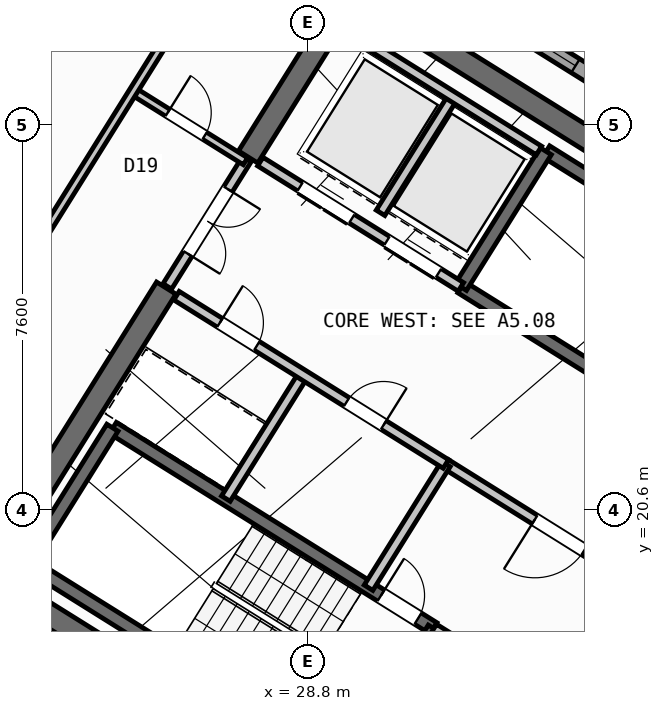
"""IFC4 building model, lengths in metres.
Left out: names, types, materials, properties, quantities, classifications, styles, units other than length and angle.
Written with IfcOpenShell. Run it as: python <this file> out.ifc"""

import sys

from ifc_helpers import new_model, si_unit, direction, frame, frame_2d, origin, place, context, subcontext, project, spatial, rectangle, extrude, source, transform, mapped, element, fill, save


model = new_model("IFC4")
c1 = context("Model", 3, precision=1e-05, world=origin(), true_north=direction((0.0, 1.0)))
c2 = subcontext(c1, "Body", "Model", "MODEL_VIEW")
j1 = project(units=[si_unit("LENGTHUNIT", "METRE"), si_unit("PLANEANGLEUNIT", "RADIAN")], contexts=[c1])
p1 = place(None, origin())
s1 = spatial("IfcSite", under=j1, at=p1, CompositionType="ELEMENT")
p2 = place(p1, origin())
s2 = spatial("IfcBuilding", under=s1, at=p2, CompositionType="ELEMENT")
p3 = place(p2, frame((0.0, 0.0, 291.6)))
s3 = spatial("IfcBuildingStorey", under=s2, at=p3, CompositionType="ELEMENT", Elevation=291.6)
p4 = place(p3, frame((40.531, 24.036, 0.0), z_axis=(0.0, 0.0, 1.0), x_axis=(-0.848048787466, 0.529918157905, 0.0)))
e1 = element("IfcWall", 1, at=p4, inside=s3, PredefinedType="SHEAR", context=c2, shape_type="SweptSolid", body=[
    extrude(rectangle(XDim=13.04, YDim=0.45, at=frame_2d((6.52, 0.0))), origin(), (0.0, 0.0, 1.0), 3.35),
])
p5 = place(p3, frame((33.324, 12.503, 0.0), z_axis=(0.0, 0.0, 1.0), x_axis=(-0.848043529849, 0.529926571782, 0.0)))
e2 = element("IfcWall", 2, at=p5, inside=s3, PredefinedType="SHEAR", context=c2, shape_type="SweptSolid", body=[
    extrude(rectangle(XDim=13.04, YDim=0.45, at=frame_2d((6.52, 0.0))), origin(), (0.0, 0.0, 1.0), 3.35),
])
p6 = place(p3, frame((36.683, 18.304, 0.0), z_axis=(0.0, 0.0, 1.0), x_axis=(-0.529904039071, -0.848057609704, 0.0)))
e3 = element("IfcWall", 3, at=p6, inside=s3, PredefinedType="SHEAR", context=c2, shape_type="SweptSolid", body=[
    extrude(rectangle(XDim=6.475, YDim=0.45, at=frame_2d((3.238, 0.0))), origin(), (0.0, 0.0, 1.0), 3.35),
])
p7 = place(p3, frame((29.544, 30.636, 0.0), z_axis=(0.0, 0.0, 1.0), x_axis=(-0.529902075036, -0.848058836916, 0.0)))
e4 = element("IfcWall", 4, at=p7, inside=s3, PredefinedType="SHEAR", context=c2, shape_type="SweptSolid", body=[
    extrude(rectangle(XDim=3.625, YDim=0.45, at=frame_2d((1.812, 0.0))), origin(), (0.0, 0.0, 1.0), 3.35),
])
p8 = place(p3, frame((26.007, 24.976, 0.0), z_axis=(0.0, 0.0, 1.0), x_axis=(-0.529931155655, -0.848040665456, 0.0)))
e5 = element("IfcWall", 5, at=p8, inside=s3, PredefinedType="SHEAR", context=c2, shape_type="SweptSolid", body=[
    extrude(rectangle(XDim=6.475, YDim=0.45, at=frame_2d((3.238, 0.0))), origin(), (0.0, 0.0, 1.0), 3.35),
])
p9 = place(p3, frame((29.268, 6.429, 0.0), z_axis=(0.0, 0.0, 1.0), x_axis=(-0.848048398186, 0.529918780885, 0.0)))
e6 = element("IfcWall", 6, at=p9, inside=s3, PredefinedType="STANDARD", context=c2, shape_type="SweptSolid", body=[
    extrude(rectangle(XDim=25.188, YDim=0.32, at=frame_2d((12.594, 0.0))), origin(), (0.0, 0.0, 1.0), 3.35),
])
p10 = place(p9, frame((16.362, 0.0, 0.0)))
e7 = element("IfcOpeningElement", 7, at=p10, cuts=e6, PredefinedType="OPENING", context=c2, shape_type="SweptSolid", body=[
    extrude(rectangle(XDim=1.2, YDim=2.15, at=frame_2d((0.6, 1.075))), frame((0.0, 0.17, 0.0), z_axis=(0.0, -1.0, 0.0), x_axis=(1.0, 0.0, 0.0)), (0.0, 0.0, 1.0), 0.34),
])
p11 = place(p9, frame((3.859, 0.0, 0.9)))
e8 = element("IfcOpeningElement", 8, at=p11, cuts=e6, PredefinedType="OPENING", context=c2, shape_type="SweptSolid", body=[
    extrude(rectangle(XDim=1.65, YDim=1.45, at=frame_2d((0.825, 0.725))), frame((0.0, 0.17, 0.0), z_axis=(0.0, -1.0, 0.0), x_axis=(1.0, 0.0, 0.0)), (0.0, 0.0, 1.0), 0.34),
])
p12 = place(p9, frame((10.519, 0.0, 0.9)))
e9 = element("IfcOpeningElement", 9, at=p12, cuts=e6, PredefinedType="OPENING", context=c2, shape_type="SweptSolid", body=[
    extrude(rectangle(XDim=1.65, YDim=1.45, at=frame_2d((0.825, 0.725))), frame((0.0, 0.17, 0.0), z_axis=(0.0, -1.0, 0.0), x_axis=(1.0, 0.0, 0.0)), (0.0, 0.0, 1.0), 0.34),
])
p13 = place(p9, frame((21.156, 0.0, 0.95)))
e10 = element("IfcOpeningElement", 10, at=p13, cuts=e6, PredefinedType="OPENING", context=c2, shape_type="SweptSolid", body=[
    extrude(rectangle(XDim=1.95, YDim=1.35, at=frame_2d((0.975, 0.675))), frame((0.0, 0.17, 0.0), z_axis=(0.0, -1.0, 0.0), x_axis=(1.0, 0.0, 0.0)), (0.0, 0.0, 1.0), 0.34),
])
p14 = place(p3, frame((19.566, 38.434, 0.0), z_axis=(0.0, 0.0, 1.0), x_axis=(0.84804567626, -0.529923136858, 0.0)))
e11 = element("IfcWall", 11, at=p14, inside=s3, PredefinedType="STANDARD", context=c2, shape_type="SweptSolid", body=[
    extrude(rectangle(XDim=25.188, YDim=0.32, at=frame_2d((12.594, 0.0))), origin(), (0.0, 0.0, 1.0), 3.35),
])
p15 = place(p14, frame((3.55, 0.0, 0.0)))
e12 = element("IfcOpeningElement", 12, at=p15, cuts=e11, PredefinedType="OPENING", context=c2, shape_type="SweptSolid", body=[
    extrude(rectangle(XDim=1.05, YDim=2.15, at=frame_2d((0.525, 1.075))), frame((0.0, 0.17, 0.0), z_axis=(0.0, -1.0, 0.0), x_axis=(1.0, 0.0, 0.0)), (0.0, 0.0, 1.0), 0.34),
])
p16 = place(p14, frame((7.349, 0.0, 0.9)))
e13 = element("IfcOpeningElement", 13, at=p16, cuts=e11, PredefinedType="OPENING", context=c2, shape_type="SweptSolid", body=[
    extrude(rectangle(XDim=1.65, YDim=1.45, at=frame_2d((0.825, 0.725))), frame((0.0, 0.17, 0.0), z_axis=(0.0, -1.0, 0.0), x_axis=(1.0, 0.0, 0.0)), (0.0, 0.0, 1.0), 0.34),
])
p17 = place(p14, frame((10.754, 0.0, 1.0)))
e14 = element("IfcOpeningElement", 14, at=p17, cuts=e11, PredefinedType="OPENING", context=c2, shape_type="SweptSolid", body=[
    extrude(rectangle(XDim=0.9, YDim=1.25, at=frame_2d((0.45, 0.625))), frame((0.0, 0.17, 0.0), z_axis=(0.0, -1.0, 0.0), x_axis=(1.0, 0.0, 0.0)), (0.0, 0.0, 1.0), 0.34),
])
p18 = place(p14, frame((15.169, 0.0, 0.95)))
e15 = element("IfcOpeningElement", 15, at=p18, cuts=e11, PredefinedType="OPENING", context=c2, shape_type="SweptSolid", body=[
    extrude(rectangle(XDim=1.95, YDim=1.35, at=frame_2d((0.975, 0.675))), frame((0.0, 0.17, 0.0), z_axis=(0.0, -1.0, 0.0), x_axis=(1.0, 0.0, 0.0)), (0.0, 0.0, 1.0), 0.34),
])
p19 = place(p14, frame((20.869, 0.0, 0.95)))
e16 = element("IfcOpeningElement", 16, at=p19, cuts=e11, PredefinedType="OPENING", context=c2, shape_type="SweptSolid", body=[
    extrude(rectangle(XDim=1.95, YDim=1.35, at=frame_2d((0.975, 0.675))), frame((0.0, 0.17, 0.0), z_axis=(0.0, -1.0, 0.0), x_axis=(1.0, 0.0, 0.0)), (0.0, 0.0, 1.0), 0.34),
])
p20 = place(p3, frame((29.605, 15.581, 0.0), z_axis=(0.0, 0.0, 1.0), x_axis=(-0.848036911448, 0.529937163087, 0.0)))
e17 = element("IfcWall", 17, at=p20, inside=s3, PredefinedType="SHEAR", context=c2, shape_type="SweptSolid", body=[
    extrude(rectangle(XDim=7.46, YDim=0.26, at=frame_2d((3.73, 0.0))), origin(), (0.0, 0.0, 1.0), 3.35),
])
p21 = place(p3, frame((31.28, 18.261, 0.0), z_axis=(0.0, 0.0, 1.0), x_axis=(-0.848051618787, 0.529913626805, 0.0)))
e18 = element("IfcWall", 18, at=p21, inside=s3, PredefinedType="SHEAR", context=c2, shape_type="SweptSolid", body=[
    extrude(rectangle(XDim=7.46, YDim=0.26, at=frame_2d((3.73, 0.0))), origin(), (0.0, 0.0, 1.0), 3.35),
])
p22 = place(p21, frame((0.36, 0.0, 0.0)))
e19 = element("IfcOpeningElement", 19, at=p22, cuts=e18, PredefinedType="OPENING", context=c2, shape_type="SweptSolid", body=[
    extrude(rectangle(XDim=0.86, YDim=2.05, at=frame_2d((0.43, 1.025))), frame((0.0, 0.14, 0.0), z_axis=(0.0, -1.0, 0.0), x_axis=(1.0, 0.0, 0.0)), (0.0, 0.0, 1.0), 0.28),
])
p23 = place(p3, frame((31.288, 18.256, 0.0), z_axis=(0.0, 0.0, 1.0), x_axis=(-0.529943379326, -0.848033026897, 0.0)))
e20 = element("IfcWall", 20, at=p23, inside=s3, PredefinedType="SHEAR", context=c2, shape_type="SweptSolid", body=[
    extrude(rectangle(XDim=3.16, YDim=0.26, at=frame_2d((1.58, 0.0))), origin(), (0.0, 0.0, 1.0), 3.35),
])
p24 = place(p3, frame((24.945, 22.22, 0.0), z_axis=(0.0, 0.0, 1.0), x_axis=(-0.529908658664, -0.84805472316, 0.0)))
e21 = element("IfcWall", 21, at=p24, inside=s3, PredefinedType="SHEAR", context=c2, shape_type="SweptSolid", body=[
    extrude(rectangle(XDim=3.16, YDim=0.26, at=frame_2d((1.58, 0.0))), origin(), (0.0, 0.0, 1.0), 3.35),
])
p25 = place(p3, frame((39.721, 23.788, 0.0), z_axis=(0.0, 0.0, 1.0), x_axis=(-0.848054434086, 0.529909121291, 0.0)))
e22 = element("IfcWall", 22, at=p25, inside=s3, PredefinedType="SHEAR", context=c2, shape_type="SweptSolid", body=[
    extrude(rectangle(XDim=7.33, YDim=0.26, at=frame_2d((3.665, 0.0))), origin(), (0.0, 0.0, 1.0), 3.35),
])
p26 = place(p3, frame((38.046, 21.108, 0.0), z_axis=(0.0, 0.0, 1.0), x_axis=(-0.848054434086, 0.529909121291, 0.0)))
e23 = element("IfcWall", 23, at=p26, inside=s3, PredefinedType="SHEAR", context=c2, shape_type="SweptSolid", body=[
    extrude(rectangle(XDim=7.33, YDim=0.26, at=frame_2d((3.665, 0.0))), origin(), (0.0, 0.0, 1.0), 3.35),
])
p27 = place(p26, frame((0.22, 0.0, 0.0)))
e24 = element("IfcOpeningElement", 24, at=p27, cuts=e23, PredefinedType="OPENING", context=c2, shape_type="SweptSolid", body=[
    extrude(rectangle(XDim=1.1, YDim=2.1, at=frame_2d((0.55, 1.05))), frame((0.0, 0.14, 0.0), z_axis=(0.0, -1.0, 0.0), x_axis=(1.0, 0.0, 0.0)), (0.0, 0.0, 1.0), 0.28),
])
p28 = place(p3, frame((33.496, 27.677, 0.0), z_axis=(0.0, 0.0, 1.0), x_axis=(-0.529908658664, -0.84805472316, 0.0)))
e25 = element("IfcWall", 25, at=p28, inside=s3, PredefinedType="SHEAR", context=c2, shape_type="SweptSolid", body=[
    extrude(rectangle(XDim=3.16, YDim=0.26, at=frame_2d((1.58, 0.0))), origin(), (0.0, 0.0, 1.0), 3.35),
])
p29 = place(p3, frame((34.933, 15.978, 0.0), z_axis=(0.0, 0.0, 1.0), x_axis=(-0.848055739377, 0.529907032327, 0.0)))
e26 = element("IfcWall", 26, at=p29, inside=s3, PredefinedType="STANDARD", context=c2, shape_type="SweptSolid", body=[
    extrude(rectangle(XDim=4.298, YDim=0.2, at=frame_2d((2.149, 0.0))), origin(), (0.0, 0.0, 1.0), 3.34),
])
p30 = place(p29, frame((0.448, 0.0, 0.0)))
e27 = element("IfcOpeningElement", 27, at=p30, cuts=e26, PredefinedType="OPENING", context=c2, shape_type="SweptSolid", body=[
    extrude(rectangle(XDim=1.3, YDim=2.2, at=frame_2d((0.65, 1.1))), frame((0.0, 0.11, 0.0), z_axis=(0.0, -1.0, 0.0), x_axis=(1.0, 0.0, 0.0)), (0.0, 0.0, 1.0), 0.22),
])
p31 = place(p29, frame((2.523, 0.0, 0.0)))
e28 = element("IfcOpeningElement", 28, at=p31, cuts=e26, PredefinedType="OPENING", context=c2, shape_type="SweptSolid", body=[
    extrude(rectangle(XDim=1.45, YDim=2.25, at=frame_2d((0.725, 1.125))), frame((0.0, 0.11, 0.0), z_axis=(0.0, -1.0, 0.0), x_axis=(1.0, 0.0, 0.0)), (0.0, 0.0, 1.0), 0.22),
])
p32 = place(p3, frame((36.459, 18.421, 0.0), z_axis=(0.0, 0.0, 1.0), x_axis=(-0.848059591691, 0.529900867089, 0.0)))
e29 = element("IfcWall", 29, at=p32, inside=s3, PredefinedType="STANDARD", context=c2, shape_type="SweptSolid", body=[
    extrude(rectangle(XDim=5.818, YDim=0.2, at=frame_2d((2.909, 0.0))), origin(), (0.0, 0.0, 1.0), 3.34),
])
p33 = place(p32, frame((2.598, 0.0, 0.0)))
e30 = element("IfcOpeningElement", 30, at=p33, cuts=e29, PredefinedType="OPENING", context=c2, shape_type="SweptSolid", body=[
    extrude(rectangle(XDim=1.15, YDim=2.1, at=frame_2d((0.575, 1.05))), frame((0.0, 0.11, 0.0), z_axis=(0.0, -1.0, 0.0), x_axis=(1.0, 0.0, 0.0)), (0.0, 0.0, 1.0), 0.22),
])
p34 = place(p3, frame((31.822, 24.998, 0.0), z_axis=(0.0, 0.0, 1.0), x_axis=(-0.848054125777, 0.529909614701, 0.0)))
e31 = element("IfcWall", 31, at=p34, inside=s3, PredefinedType="STANDARD", context=c2, shape_type="SweptSolid", body=[
    extrude(rectangle(XDim=4.668, YDim=0.2, at=frame_2d((2.334, 0.0))), origin(), (0.0, 0.0, 1.0), 3.34),
])
p35 = place(p34, frame((0.52, 0.0, 0.0)))
e32 = element("IfcOpeningElement", 32, at=p35, cuts=e31, PredefinedType="OPENING", context=c2, shape_type="SweptSolid", body=[
    extrude(rectangle(XDim=1.2, YDim=2.15, at=frame_2d((0.6, 1.075))), frame((0.0, 0.11, 0.0), z_axis=(0.0, -1.0, 0.0), x_axis=(1.0, 0.0, 0.0)), (0.0, 0.0, 1.0), 0.22),
])
p36 = place(p34, frame((2.54, 0.0, 0.0)))
e33 = element("IfcOpeningElement", 33, at=p36, cuts=e31, PredefinedType="OPENING", context=c2, shape_type="SweptSolid", body=[
    extrude(rectangle(XDim=1.2, YDim=2.15, at=frame_2d((0.6, 1.075))), frame((0.0, 0.11, 0.0), z_axis=(0.0, -1.0, 0.0), x_axis=(1.0, 0.0, 0.0)), (0.0, 0.0, 1.0), 0.22),
])
p37 = place(p3, frame((31.645, 28.716, 0.0), z_axis=(0.0, 0.0, 1.0), x_axis=(-0.52986693015, -0.848080795876, 0.0)))
e34 = element("IfcWall", 34, at=p37, inside=s3, PredefinedType="STANDARD", context=c2, shape_type="SweptSolid", body=[
    extrude(rectangle(XDim=2.66, YDim=0.2, at=frame_2d((1.33, 0.0))), origin(), (0.0, 0.0, 1.0), 3.34),
])
p38 = place(p3, frame((33.363, 27.69, 0.0), z_axis=(0.0, 0.0, 1.0), x_axis=(-0.84804957148, 0.529916903215, 0.0)))
e35 = element("IfcWall", 35, at=p38, inside=s3, PredefinedType="STANDARD", context=c2, shape_type="SweptSolid", body=[
    extrude(rectangle(XDim=4.548, YDim=0.2, at=frame_2d((2.274, 0.0))), origin(), (0.0, 0.0, 1.0), 3.34),
])
for number, where, z_axis, x_axis in (
    (36, (31.525, 21.504, 0.0), (0.0, 0.0, 1.0), (-0.53, -0.848, 0.0)),
    (37, (28.71, 23.263, 0.0), (0.0, 0.0, 1.0), (-0.53, -0.848, 0.0)),
):
    element("IfcWall", number, at=place(p3, frame(where, z_axis=z_axis, x_axis=x_axis)), inside=s3, PredefinedType="STANDARD", context=c2, shape_type="SweptSolid", body=[
        extrude(rectangle(XDim=2.88, YDim=0.2, at=frame_2d((1.44, 0.0))), origin(), (0.0, 0.0, 1.0), 3.34),
    ])
p39 = place(p3, frame((31.525, 21.504, 0.0), z_axis=(0.0, 0.0, 1.0), x_axis=(-0.848042066329, 0.529928913853, 0.0)))
e38 = element("IfcWall", 38, at=p39, inside=s3, PredefinedType="STANDARD", context=c2, shape_type="SweptSolid", body=[
    extrude(rectangle(XDim=6.268, YDim=0.2, at=frame_2d((3.134, 0.0))), origin(), (0.0, 0.0, 1.0), 3.34),
])
p40 = place(p39, frame((4.4, 0.0, 0.0)))
e39 = element("IfcOpeningElement", 39, at=p40, cuts=e38, PredefinedType="OPENING", context=c2, shape_type="SweptSolid", body=[
    extrude(rectangle(XDim=0.86, YDim=2.05, at=frame_2d((0.43, 1.025))), frame((0.0, 0.11, 0.0), z_axis=(0.0, -1.0, 0.0), x_axis=(1.0, 0.0, 0.0)), (0.0, 0.0, 1.0), 0.22),
])
p41 = place(p39, frame((1.45, 0.0, 0.0)))
e40 = element("IfcOpeningElement", 40, at=p41, cuts=e38, PredefinedType="OPENING", context=c2, shape_type="SweptSolid", body=[
    extrude(rectangle(XDim=0.86, YDim=2.05, at=frame_2d((0.43, 1.025))), frame((0.0, 0.11, 0.0), z_axis=(0.0, -1.0, 0.0), x_axis=(1.0, 0.0, 0.0)), (0.0, 0.0, 1.0), 0.22),
])
p42 = place(p3, frame((27.596, 27.52, 0.0), z_axis=(0.0, 0.0, 1.0), x_axis=(-0.529865479138, -0.848081702443, 0.0)))
e41 = element("IfcWall", 41, at=p42, inside=s3, PredefinedType="STANDARD", context=c2, shape_type="SweptSolid", body=[
    extrude(rectangle(XDim=2.96, YDim=0.2, at=frame_2d((1.48, 0.0))), origin(), (0.0, 0.0, 1.0), 3.34),
])
p43 = place(p42, frame((0.7, 0.0, 0.0)))
e42 = element("IfcOpeningElement", 42, at=p43, cuts=e41, PredefinedType="OPENING", context=c2, shape_type="SweptSolid", body=[
    extrude(rectangle(XDim=1.5, YDim=2.15, at=frame_2d((0.75, 1.075))), frame((0.0, 0.11, 0.0), z_axis=(0.0, -1.0, 0.0), x_axis=(1.0, 0.0, 0.0)), (0.0, 0.0, 1.0), 0.22),
])
p44 = place(p3, frame((27.57, 27.478, 0.0), z_axis=(0.0, 0.0, 1.0), x_axis=(-0.848050851465, 0.529914854792, 0.0)))
e43 = element("IfcWall", 43, at=p44, inside=s3, PredefinedType="PARTITIONING", context=c2, shape_type="SweptSolid", body=[
    extrude(rectangle(XDim=2.61, YDim=0.16, at=frame_2d((1.305, 0.0))), origin(), (0.0, 0.0, 1.0), 3.34),
])
p45 = place(p44, frame((0.95, 0.0, 0.0)))
e44 = element("IfcOpeningElement", 44, at=p45, cuts=e43, PredefinedType="OPENING", context=c2, shape_type="SweptSolid", body=[
    extrude(rectangle(XDim=0.86, YDim=2.05, at=frame_2d((0.43, 1.025))), frame((0.0, 0.09, 0.0), z_axis=(0.0, -1.0, 0.0), x_axis=(1.0, 0.0, 0.0)), (0.0, 0.0, 1.0), 0.18),
])
p46 = place(p3, frame((27.953, 33.016, 0.0), z_axis=(0.0, 0.0, 1.0), x_axis=(-0.529903001606, -0.848058257957, 0.0)))
e45 = element("IfcWall", 45, at=p46, inside=s3, PredefinedType="PARTITIONING", context=c2, shape_type="SweptSolid", body=[
    extrude(rectangle(XDim=9.15, YDim=0.16, at=frame_2d((4.575, 0.0))), origin(), (0.0, 0.0, 1.0), 3.34),
])
p47 = place(p3, frame((24.309, 34.336, 0.0), z_axis=(0.0, 0.0, 1.0), x_axis=(-0.529895484599, -0.848062954858, 0.0)))
e46 = element("IfcWall", 46, at=p47, inside=s3, PredefinedType="PARTITIONING", context=c2, shape_type="SweptSolid", body=[
    extrude(rectangle(XDim=6.576, YDim=0.16, at=frame_2d((3.288, 0.0))), origin(), (0.0, 0.0, 1.0), 2.875),
])
p48 = place(p3, frame((32.164, 10.374, 0.0), z_axis=(0.0, 0.0, 1.0), x_axis=(-0.848044107957, 0.529925646633, 0.0)))
e47 = element("IfcWall", 47, at=p48, inside=s3, PredefinedType="PARTITIONING", context=c2, shape_type="SweptSolid", body=[
    extrude(rectangle(XDim=15.57, YDim=0.16, at=frame_2d((7.785, 0.0))), origin(), (0.0, 0.0, 1.0), 3.34),
])
p49 = place(p48, frame((10.83, 0.0, 0.0)))
e48 = element("IfcOpeningElement", 48, at=p49, cuts=e47, PredefinedType="OPENING", context=c2, shape_type="SweptSolid", body=[
    extrude(rectangle(XDim=1.0, YDim=2.1, at=frame_2d((0.5, 1.05))), frame((0.0, 0.09, 0.0), z_axis=(0.0, -1.0, 0.0), x_axis=(1.0, 0.0, 0.0)), (0.0, 0.0, 1.0), 0.18),
])
m1 = source(origin(), c2, "Body", "SweptSolid", [
    extrude(rectangle(XDim=1.95, YDim=1.35, at=frame_2d((0.975, 0.675))), frame((0.0, 0.03, 0.0), z_axis=(0.0, -1.0, 0.0), x_axis=(1.0, 0.0, 0.0)), (0.0, 0.0, 1.0), 0.06),
])
p50 = place(p18, origin())
e49 = element("IfcWindow", 49, at=p50, inside=s3, PartitioningType="SINGLE_PANEL", PredefinedType="WINDOW", context=c2, shape_type="MappedRepresentation", body=[
    mapped(m1, transform((0.0, 0.0, 0.0), scale=1.0)),
])
fill(e15, e49)
m2 = source(origin(), c2, "Body", "SweptSolid", [
    extrude(rectangle(XDim=0.86, YDim=2.05, at=frame_2d((0.43, 1.025))), frame((0.0, 0.025, 0.0), z_axis=(0.0, -1.0, 0.0), x_axis=(1.0, 0.0, 0.0)), (0.0, 0.0, 1.0), 0.05),
])
p51 = place(p22, frame((0.86, 0.0, 0.0), z_axis=(0.0, 0.0, 1.0), x_axis=(-1.0, 0.0, 0.0)))
e50 = element("IfcDoor", 50, at=p51, inside=s3, OperationType="SINGLE_SWING_LEFT", PredefinedType="DOOR", context=c2, shape_type="MappedRepresentation", body=[
    mapped(m2, transform((0.0, 0.0, 0.0), scale=1.0)),
])
fill(e19, e50)
m3 = source(origin(), c2, "Body", "SweptSolid", [
    extrude(rectangle(XDim=1.15, YDim=2.1, at=frame_2d((0.575, 1.05))), frame((0.0, 0.025, 0.0), z_axis=(0.0, -1.0, 0.0), x_axis=(1.0, 0.0, 0.0)), (0.0, 0.0, 1.0), 0.05),
])
p52 = place(p33, origin())
e51 = element("IfcDoor", 51, at=p52, inside=s3, OperationType="SINGLE_SWING_RIGHT", PredefinedType="DOOR", context=c2, shape_type="MappedRepresentation", body=[
    mapped(m3, transform((0.0, 0.0, 0.0), scale=1.0)),
])
fill(e30, e51)
m4 = source(origin(), c2, "Body", "SweptSolid", [
    extrude(rectangle(XDim=1.2, YDim=2.15, at=frame_2d((0.6, 1.075))), frame((0.0, 0.025, 0.0), z_axis=(0.0, -1.0, 0.0), x_axis=(1.0, 0.0, 0.0)), (0.0, 0.0, 1.0), 0.05),
])
p53 = place(p35, origin())
e52 = element("IfcDoor", 52, at=p53, inside=s3, OperationType="DOUBLE_DOOR_SLIDING", PredefinedType="DOOR", context=c2, shape_type="MappedRepresentation", body=[
    mapped(m4, transform((0.0, 0.0, 0.0), scale=1.0)),
])
fill(e32, e52)
p54 = place(p36, origin())
e53 = element("IfcDoor", 53, at=p54, inside=s3, OperationType="DOUBLE_DOOR_SLIDING", PredefinedType="DOOR", context=c2, shape_type="MappedRepresentation", body=[
    mapped(m4, transform((0.0, 0.0, 0.0), scale=1.0)),
])
fill(e33, e53)
p55 = place(p40, frame((0.86, 0.0, 0.0), z_axis=(0.0, 0.0, 1.0), x_axis=(-1.0, 0.0, 0.0)))
e54 = element("IfcDoor", 54, at=p55, inside=s3, OperationType="SINGLE_SWING_LEFT", PredefinedType="DOOR", context=c2, shape_type="MappedRepresentation", body=[
    mapped(m2, transform((0.0, 0.0, 0.0), scale=1.0)),
])
fill(e39, e54)
p56 = place(p41, frame((0.86, 0.0, 0.0), z_axis=(0.0, 0.0, 1.0), x_axis=(-1.0, 0.0, 0.0)))
e55 = element("IfcDoor", 55, at=p56, inside=s3, OperationType="SINGLE_SWING_RIGHT", PredefinedType="DOOR", context=c2, shape_type="MappedRepresentation", body=[
    mapped(m2, transform((0.0, 0.0, 0.0), scale=1.0)),
])
fill(e40, e55)
p57 = place(p45, frame((0.86, 0.0, 0.0), z_axis=(0.0, 0.0, 1.0), x_axis=(-1.0, 0.0, 0.0)))
e56 = element("IfcDoor", 56, at=p57, inside=s3, OperationType="SINGLE_SWING_LEFT", PredefinedType="DOOR", context=c2, shape_type="MappedRepresentation", body=[
    mapped(m2, transform((0.0, 0.0, 0.0), scale=1.0)),
])
fill(e44, e56)
m5 = source(origin(), c2, "Body", "SweptSolid", [
    extrude(rectangle(XDim=1.5, YDim=2.15, at=frame_2d((0.75, 1.075))), frame((0.0, 0.025, 0.0), z_axis=(0.0, -1.0, 0.0), x_axis=(1.0, 0.0, 0.0)), (0.0, 0.0, 1.0), 0.05),
])
p58 = place(p43, origin())
e57 = element("IfcDoor", 57, at=p58, inside=s3, OperationType="DOUBLE_DOOR_SINGLE_SWING", PredefinedType="DOOR", context=c2, shape_type="MappedRepresentation", body=[
    mapped(m5, transform((0.0, 0.0, 0.0), scale=1.0)),
])
fill(e42, e57)
save(model, sys.argv[1])
